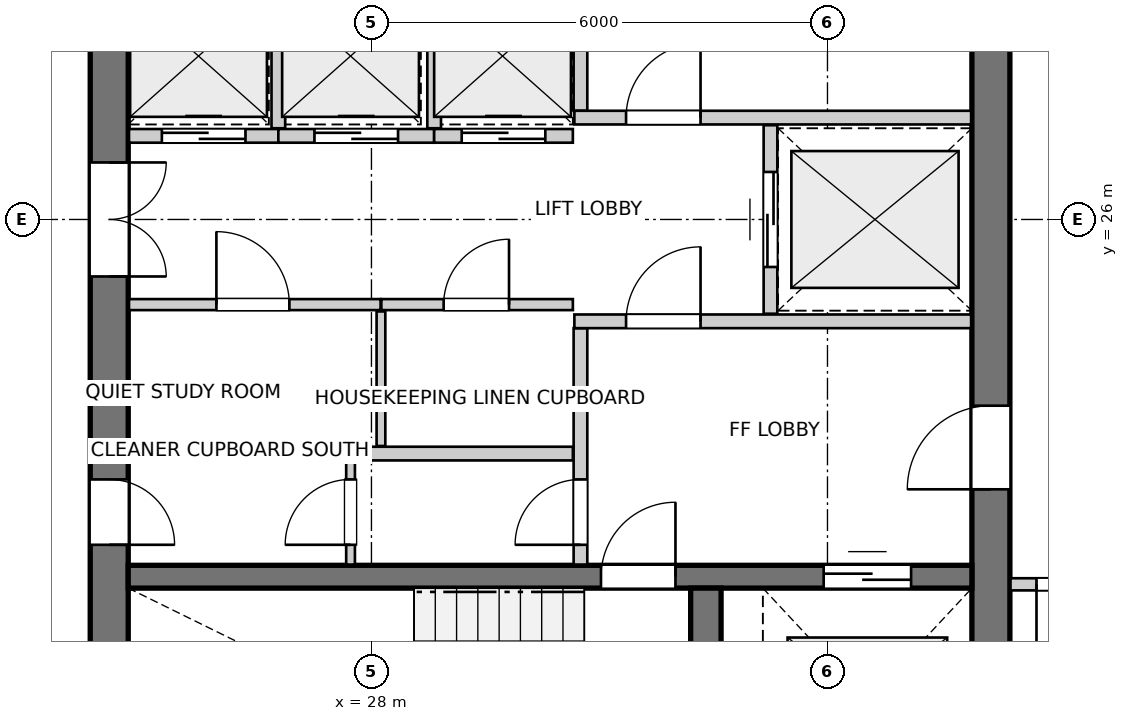
"""IFC4 building model, lengths in metres.
Left out: names, types, materials, properties, quantities, classifications, styles, units other than length and angle.
Written with IfcOpenShell. Run it as: python <this file> out.ifc"""

import sys

from ifc_helpers import new_model, si_unit, direction, frame, frame_2d, origin, place, context, subcontext, project, spatial, rectangle, extrude, source, transform, mapped, element, fill, save


model = new_model("IFC4")
c1 = context("Model", 3, precision=1e-05, world=origin(), true_north=direction((0.0, 1.0)))
c2 = subcontext(c1, "Body", "Model", "MODEL_VIEW")
j1 = project(units=[si_unit("LENGTHUNIT", "METRE"), si_unit("PLANEANGLEUNIT", "RADIAN")], contexts=[c1])
p1 = place(None, origin())
s1 = spatial("IfcSite", under=j1, at=p1, CompositionType="ELEMENT")
p2 = place(p1, origin())
s2 = spatial("IfcBuilding", under=s1, at=p2, CompositionType="ELEMENT")
p3 = place(p2, frame((0.0, 0.0, 208.4)))
s3 = spatial("IfcBuildingStorey", under=s2, at=p3, CompositionType="ELEMENT", Elevation=208.4)
p4 = place(p3, frame((24.55, 33.8, 0.0), z_axis=(0.0, 0.0, 1.0), x_axis=(0.0, -1.0, 0.0)))
e1 = element("IfcWall", 1, at=p4, inside=s3, PredefinedType="SHEAR", context=c2, shape_type="SweptSolid", body=[
    extrude(rectangle(XDim=15.6, YDim=0.5, at=frame_2d((7.8, 0.0))), origin(), (0.0, 0.0, 1.0), 2.935),
])
p5 = place(p4, frame((7.05, 0.0, 0.0)))
e2 = element("IfcOpeningElement", 2, at=p5, cuts=e1, PredefinedType="OPENING", context=c2, shape_type="SweptSolid", body=[
    extrude(rectangle(XDim=1.5, YDim=2.15, at=frame_2d((0.75, 1.075))), frame((0.0, 0.26, 0.0), z_axis=(0.0, -1.0, 0.0), x_axis=(1.0, 0.0, 0.0)), (0.0, 0.0, 1.0), 0.52),
])
p6 = place(p4, frame((3.52, 0.0, 0.0)))
e3 = element("IfcOpeningElement", 3, at=p6, cuts=e1, PredefinedType="OPENING", context=c2, shape_type="SweptSolid", body=[
    extrude(rectangle(XDim=0.86, YDim=2.05, at=frame_2d((0.43, 1.025))), frame((0.0, 0.26, 0.0), z_axis=(0.0, -1.0, 0.0), x_axis=(1.0, 0.0, 0.0)), (0.0, 0.0, 1.0), 0.52),
])
p7 = place(p4, frame((11.22, 0.0, 0.0)))
e4 = element("IfcOpeningElement", 4, at=p7, cuts=e1, PredefinedType="OPENING", context=c2, shape_type="SweptSolid", body=[
    extrude(rectangle(XDim=0.86, YDim=2.05, at=frame_2d((0.43, 1.025))), frame((0.0, 0.26, 0.0), z_axis=(0.0, -1.0, 0.0), x_axis=(1.0, 0.0, 0.0)), (0.0, 0.0, 1.0), 0.52),
])
p8 = place(p3, frame((36.15, 18.2, 0.0), z_axis=(0.0, 0.0, 1.0), x_axis=(0.0, 1.0, 0.0)))
e5 = element("IfcWall", 5, at=p8, inside=s3, PredefinedType="SHEAR", context=c2, shape_type="SweptSolid", body=[
    extrude(rectangle(XDim=15.6, YDim=0.5, at=frame_2d((7.8, 0.0))), origin(), (0.0, 0.0, 1.0), 2.935),
])
p9 = place(p8, frame((4.25, 0.0, 0.0)))
e6 = element("IfcOpeningElement", 6, at=p9, cuts=e5, PredefinedType="OPENING", context=c2, shape_type="SweptSolid", body=[
    extrude(rectangle(XDim=1.1, YDim=2.15, at=frame_2d((0.55, 1.075))), frame((0.0, 0.26, 0.0), z_axis=(0.0, -1.0, 0.0), x_axis=(1.0, 0.0, 0.0)), (0.0, 0.0, 1.0), 0.52),
])
p10 = place(p8, frame((10.25, 0.0, 0.0)))
e7 = element("IfcOpeningElement", 7, at=p10, cuts=e5, PredefinedType="OPENING", context=c2, shape_type="SweptSolid", body=[
    extrude(rectangle(XDim=1.1, YDim=2.15, at=frame_2d((0.55, 1.075))), frame((0.0, 0.26, 0.0), z_axis=(0.0, -1.0, 0.0), x_axis=(1.0, 0.0, 0.0)), (0.0, 0.0, 1.0), 0.52),
])
p11 = place(p3, frame((24.8, 21.3, 0.0), z_axis=(0.0, 0.0, 1.0), x_axis=(1.0, 0.0, 0.0)))
e8 = element("IfcWall", 8, at=p11, inside=s3, PredefinedType="SHEAR", context=c2, shape_type="SweptSolid", body=[
    extrude(rectangle(XDim=11.1, YDim=0.3, at=frame_2d((5.55, 0.0))), origin(), (0.0, 0.0, 1.0), 2.935),
])
p12 = place(p11, frame((6.22, 0.0, 0.0)))
e9 = element("IfcOpeningElement", 9, at=p12, cuts=e8, PredefinedType="OPENING", context=c2, shape_type="SweptSolid", body=[
    extrude(rectangle(XDim=0.98, YDim=2.15, at=frame_2d((0.49, 1.075))), frame((0.0, 0.16, 0.0), z_axis=(0.0, -1.0, 0.0), x_axis=(1.0, 0.0, 0.0)), (0.0, 0.0, 1.0), 0.32),
])
p13 = place(p11, frame((9.15, 0.0, 0.0)))
e10 = element("IfcOpeningElement", 10, at=p13, cuts=e8, PredefinedType="OPENING", context=c2, shape_type="SweptSolid", body=[
    extrude(rectangle(XDim=1.15, YDim=2.15, at=frame_2d((0.575, 1.075))), frame((0.0, 0.16, 0.0), z_axis=(0.0, -1.0, 0.0), x_axis=(1.0, 0.0, 0.0)), (0.0, 0.0, 1.0), 0.32),
])
p14 = place(p3, frame((32.4, 18.2, 0.0), z_axis=(0.0, 0.0, 1.0), x_axis=(0.0, 1.0, 0.0)))
e11 = element("IfcWall", 11, at=p14, inside=s3, PredefinedType="SHEAR", context=c2, shape_type="SweptSolid", body=[
    extrude(rectangle(XDim=2.95, YDim=0.4, at=frame_2d((1.475, 0.0))), origin(), (0.0, 0.0, 1.0), 2.935),
])
p15 = place(p3, frame((30.75, 21.46, 0.0), z_axis=(0.0, 0.0, 1.0), x_axis=(0.0, 1.0, 0.0)))
e12 = element("IfcWall", 12, at=p15, inside=s3, PredefinedType="PARTITIONING", context=c2, shape_type="SweptSolid", body=[
    extrude(rectangle(XDim=3.11, YDim=0.18, at=frame_2d((1.555, 0.0))), origin(), (0.0, 0.0, 1.0), 2.935),
])
p16 = place(p15, frame((0.26, 0.0, 0.0)))
e13 = element("IfcOpeningElement", 13, at=p16, cuts=e12, PredefinedType="OPENING", context=c2, shape_type="SweptSolid", body=[
    extrude(rectangle(XDim=0.86, YDim=2.05, at=frame_2d((0.43, 1.025))), frame((0.0, 0.1, 0.0), z_axis=(0.0, -1.0, 0.0), x_axis=(1.0, 0.0, 0.0)), (0.0, 0.0, 1.0), 0.2),
])
p17 = place(p3, frame((30.67, 24.66, 0.0), z_axis=(0.0, 0.0, 1.0), x_axis=(1.0, 0.0, 0.0)))
e14 = element("IfcWall", 14, at=p17, inside=s3, PredefinedType="PARTITIONING", context=c2, shape_type="SweptSolid", body=[
    extrude(rectangle(XDim=5.22, YDim=0.18, at=frame_2d((2.61, 0.0))), origin(), (0.0, 0.0, 1.0), 2.935),
])
p18 = place(p17, frame((0.68, 0.0, 0.0)))
e15 = element("IfcOpeningElement", 15, at=p18, cuts=e14, PredefinedType="OPENING", context=c2, shape_type="SweptSolid", body=[
    extrude(rectangle(XDim=0.98, YDim=2.15, at=frame_2d((0.49, 1.075))), frame((0.0, 0.1, 0.0), z_axis=(0.0, -1.0, 0.0), x_axis=(1.0, 0.0, 0.0)), (0.0, 0.0, 1.0), 0.2),
])
p19 = place(p3, frame((30.75, 27.43, 0.0), z_axis=(0.0, 0.0, 1.0), x_axis=(0.0, 1.0, 0.0)))
e16 = element("IfcWall", 16, at=p19, inside=s3, PredefinedType="PARTITIONING", context=c2, shape_type="SweptSolid", body=[
    extrude(rectangle(XDim=3.11, YDim=0.18, at=frame_2d((1.555, 0.0))), origin(), (0.0, 0.0, 1.0), 2.935),
])
p20 = place(p19, frame((1.98, 0.0, 0.0)))
e17 = element("IfcOpeningElement", 17, at=p20, cuts=e16, PredefinedType="OPENING", context=c2, shape_type="SweptSolid", body=[
    extrude(rectangle(XDim=0.86, YDim=2.05, at=frame_2d((0.43, 1.025))), frame((0.0, 0.1, 0.0), z_axis=(0.0, -1.0, 0.0), x_axis=(1.0, 0.0, 0.0)), (0.0, 0.0, 1.0), 0.2),
])
p21 = place(p3, frame((30.67, 27.34, 0.0), z_axis=(0.0, 0.0, 1.0), x_axis=(1.0, 0.0, 0.0)))
e18 = element("IfcWall", 18, at=p21, inside=s3, PredefinedType="PARTITIONING", context=c2, shape_type="SweptSolid", body=[
    extrude(rectangle(XDim=5.22, YDim=0.18, at=frame_2d((2.61, 0.0))), origin(), (0.0, 0.0, 1.0), 2.935),
])
p22 = place(p21, frame((0.68, 0.0, 0.0)))
e19 = element("IfcOpeningElement", 19, at=p22, cuts=e18, PredefinedType="OPENING", context=c2, shape_type="SweptSolid", body=[
    extrude(rectangle(XDim=0.98, YDim=2.15, at=frame_2d((0.49, 1.075))), frame((0.0, 0.1, 0.0), z_axis=(0.0, -1.0, 0.0), x_axis=(1.0, 0.0, 0.0)), (0.0, 0.0, 1.0), 0.2),
])
p23 = place(p3, frame((33.25, 24.76, 0.0), z_axis=(0.0, 0.0, 1.0), x_axis=(0.0, 1.0, 0.0)))
e20 = element("IfcWall", 20, at=p23, inside=s3, PredefinedType="PARTITIONING", context=c2, shape_type="SweptSolid", body=[
    extrude(rectangle(XDim=2.48, YDim=0.18, at=frame_2d((1.24, 0.0))), origin(), (0.0, 0.0, 1.0), 2.935),
])
p24 = place(p23, frame((0.615, 0.0, 0.0)))
e21 = element("IfcOpeningElement", 21, at=p24, cuts=e20, PredefinedType="OPENING", context=c2, shape_type="SweptSolid", body=[
    extrude(rectangle(XDim=1.25, YDim=2.15, at=frame_2d((0.625, 1.075))), frame((0.0, 0.1, 0.0), z_axis=(0.0, -1.0, 0.0), x_axis=(1.0, 0.0, 0.0)), (0.0, 0.0, 1.0), 0.2),
])
p25 = place(p3, frame((24.81, 22.92, 0.0), z_axis=(0.0, 0.0, 1.0), x_axis=(1.0, 0.0, 0.0)))
e22 = element("IfcWall", 22, at=p25, inside=s3, PredefinedType="PARTITIONING", context=c2, shape_type="SweptSolid", body=[
    extrude(rectangle(XDim=5.84, YDim=0.18, at=frame_2d((2.92, 0.0))), origin(), (0.0, 0.0, 1.0), 2.935),
])
p26 = place(p3, frame((24.81, 24.88, 0.0), z_axis=(0.0, 0.0, 1.0), x_axis=(1.0, 0.0, 0.0)))
e23 = element("IfcWall", 23, at=p26, inside=s3, PredefinedType="PARTITIONING", context=c2, shape_type="SweptSolid", body=[
    extrude(rectangle(XDim=3.31, YDim=0.145, at=frame_2d((1.655, 0.0))), origin(), (0.0, 0.0, 1.0), 2.935),
])
p27 = place(p26, frame((1.15, 0.0, 0.0)))
e24 = element("IfcOpeningElement", 24, at=p27, cuts=e23, PredefinedType="OPENING", context=c2, shape_type="SweptSolid", body=[
    extrude(rectangle(XDim=0.96, YDim=2.1, at=frame_2d((0.48, 1.05))), frame((0.0, 0.083, 0.0), z_axis=(0.0, -1.0, 0.0), x_axis=(1.0, 0.0, 0.0)), (0.0, 0.0, 1.0), 0.165),
])
p28 = place(p3, frame((28.13, 24.88, 0.0), z_axis=(0.0, 0.0, 1.0), x_axis=(1.0, 0.0, 0.0)))
e25 = element("IfcWall", 25, at=p28, inside=s3, PredefinedType="PARTITIONING", context=c2, shape_type="SweptSolid", body=[
    extrude(rectangle(XDim=2.52, YDim=0.145, at=frame_2d((1.26, 0.0))), origin(), (0.0, 0.0, 1.0), 2.935),
])
p29 = place(p28, frame((0.82, 0.0, 0.0)))
e26 = element("IfcOpeningElement", 26, at=p29, cuts=e25, PredefinedType="OPENING", context=c2, shape_type="SweptSolid", body=[
    extrude(rectangle(XDim=0.86, YDim=2.05, at=frame_2d((0.43, 1.025))), frame((0.0, 0.083, 0.0), z_axis=(0.0, -1.0, 0.0), x_axis=(1.0, 0.0, 0.0)), (0.0, 0.0, 1.0), 0.165),
])
p30 = place(p3, frame((28.125, 23.02, 0.0), z_axis=(0.0, 0.0, 1.0), x_axis=(0.0, 1.0, 0.0)))
e27 = element("IfcWall", 27, at=p30, inside=s3, PredefinedType="PARTITIONING", context=c2, shape_type="SweptSolid", body=[
    extrude(rectangle(XDim=1.77, YDim=0.115, at=frame_2d((0.885, 0.0))), origin(), (0.0, 0.0, 1.0), 2.935),
])
p31 = place(p3, frame((24.81, 27.1, 0.0), z_axis=(0.0, 0.0, 1.0), x_axis=(1.0, 0.0, 0.0)))
e28 = element("IfcWall", 28, at=p31, inside=s3, PredefinedType="PARTITIONING", context=c2, shape_type="SweptSolid", body=[
    extrude(rectangle(XDim=1.965, YDim=0.18, at=frame_2d((0.982, 0.0))), origin(), (0.0, 0.0, 1.0), 2.935),
])
p32 = place(p31, frame((0.433, 0.0, 0.0)))
e29 = element("IfcOpeningElement", 29, at=p32, cuts=e28, PredefinedType="OPENING", context=c2, shape_type="SweptSolid", body=[
    extrude(rectangle(XDim=1.1, YDim=2.15, at=frame_2d((0.55, 1.075))), frame((0.0, 0.1, 0.0), z_axis=(0.0, -1.0, 0.0), x_axis=(1.0, 0.0, 0.0)), (0.0, 0.0, 1.0), 0.2),
])
p33 = place(p3, frame((26.775, 27.1, 0.0), z_axis=(0.0, 0.0, 1.0), x_axis=(1.0, 0.0, 0.0)))
e30 = element("IfcWall", 30, at=p33, inside=s3, PredefinedType="PARTITIONING", context=c2, shape_type="SweptSolid", body=[
    extrude(rectangle(XDim=2.05, YDim=0.18, at=frame_2d((1.025, 0.0))), origin(), (0.0, 0.0, 1.0), 2.935),
])
p34 = place(p33, frame((0.475, 0.0, 0.0)))
e31 = element("IfcOpeningElement", 31, at=p34, cuts=e30, PredefinedType="OPENING", context=c2, shape_type="SweptSolid", body=[
    extrude(rectangle(XDim=1.1, YDim=2.15, at=frame_2d((0.55, 1.075))), frame((0.0, 0.1, 0.0), z_axis=(0.0, -1.0, 0.0), x_axis=(1.0, 0.0, 0.0)), (0.0, 0.0, 1.0), 0.2),
])
p35 = place(p3, frame((26.775, 27.2, 0.0), z_axis=(0.0, 0.0, 1.0), x_axis=(0.0, 1.0, 0.0)))
e32 = element("IfcWall", 32, at=p35, inside=s3, PredefinedType="PARTITIONING", context=c2, shape_type="SweptSolid", body=[
    extrude(rectangle(XDim=1.78, YDim=0.18, at=frame_2d((0.89, 0.0))), origin(), (0.0, 0.0, 1.0), 2.935),
])
p36 = place(p3, frame((28.825, 27.1, 0.0), z_axis=(0.0, 0.0, 1.0), x_axis=(1.0, 0.0, 0.0)))
e33 = element("IfcWall", 33, at=p36, inside=s3, PredefinedType="PARTITIONING", context=c2, shape_type="SweptSolid", body=[
    extrude(rectangle(XDim=1.825, YDim=0.18, at=frame_2d((0.913, 0.0))), origin(), (0.0, 0.0, 1.0), 2.935),
])
p37 = place(p36, frame((0.363, 0.0, 0.0)))
e34 = element("IfcOpeningElement", 34, at=p37, cuts=e33, PredefinedType="OPENING", context=c2, shape_type="SweptSolid", body=[
    extrude(rectangle(XDim=1.1, YDim=2.15, at=frame_2d((0.55, 1.075))), frame((0.0, 0.1, 0.0), z_axis=(0.0, -1.0, 0.0), x_axis=(1.0, 0.0, 0.0)), (0.0, 0.0, 1.0), 0.2),
])
p38 = place(p3, frame((28.825, 27.2, 0.0), z_axis=(0.0, 0.0, 1.0), x_axis=(0.0, 1.0, 0.0)))
e35 = element("IfcWall", 35, at=p38, inside=s3, PredefinedType="PARTITIONING", context=c2, shape_type="SweptSolid", body=[
    extrude(rectangle(XDim=1.78, YDim=0.18, at=frame_2d((0.89, 0.0))), origin(), (0.0, 0.0, 1.0), 2.935),
])
p39 = place(p3, frame((27.725, 21.46, 0.0), z_axis=(0.0, 0.0, 1.0), x_axis=(0.0, 1.0, 0.0)))
e36 = element("IfcWall", 36, at=p39, inside=s3, PredefinedType="PARTITIONING", context=c2, shape_type="SweptSolid", body=[
    extrude(rectangle(XDim=1.38, YDim=0.115, at=frame_2d((0.69, 0.0))), origin(), (0.0, 0.0, 1.0), 2.935),
])
p40 = place(p39, frame((0.26, 0.0, 0.0)))
e37 = element("IfcOpeningElement", 37, at=p40, cuts=e36, PredefinedType="OPENING", context=c2, shape_type="SweptSolid", body=[
    extrude(rectangle(XDim=0.86, YDim=2.05, at=frame_2d((0.43, 1.025))), frame((0.0, 0.067, 0.0), z_axis=(0.0, -1.0, 0.0), x_axis=(1.0, 0.0, 0.0)), (0.0, 0.0, 1.0), 0.135),
])
p41 = place(p3, frame((38.02, 21.2, 0.0), z_axis=(0.0, 0.0, 1.0), x_axis=(-1.0, 0.0, 0.0)))
e38 = element("IfcWall", 38, at=p41, inside=s3, PredefinedType="PARTITIONING", context=c2, shape_type="SweptSolid", body=[
    extrude(rectangle(XDim=1.612, YDim=0.16, at=frame_2d((0.806, 0.0))), origin(), (0.0, 0.0, 1.0), 2.935),
])
p42 = place(p41, frame((0.35, 0.0, 0.0)))
e39 = element("IfcOpeningElement", 39, at=p42, cuts=e38, PredefinedType="OPENING", context=c2, shape_type="SweptSolid", body=[
    extrude(rectangle(XDim=0.92, YDim=2.1, at=frame_2d((0.46, 1.05))), frame((0.0, 0.09, 0.0), z_axis=(0.0, -1.0, 0.0), x_axis=(1.0, 0.0, 0.0)), (0.0, 0.0, 1.0), 0.18),
])
m1 = source(origin(), c2, "Body", "SweptSolid", [
    extrude(rectangle(XDim=0.98, YDim=2.15, at=frame_2d((0.49, 1.075))), frame((0.0, 0.025, 0.0), z_axis=(0.0, -1.0, 0.0), x_axis=(1.0, 0.0, 0.0)), (0.0, 0.0, 1.0), 0.05),
])
p43 = place(p12, origin())
e40 = element("IfcDoor", 40, at=p43, inside=s3, OperationType="SINGLE_SWING_RIGHT", PredefinedType="DOOR", context=c2, shape_type="MappedRepresentation", body=[
    mapped(m1, transform((0.0, 0.0, 0.0), x_axis=(1.0, 0.0, 0.0), y_axis=(0.0, 1.0, 0.0), z_axis=(0.0, 0.0, 1.0), scale=1.0)),
])
fill(e9, e40)
m2 = source(origin(), c2, "Body", "SweptSolid", [
    extrude(rectangle(XDim=1.15, YDim=2.15, at=frame_2d((0.575, 1.075))), frame((0.0, 0.025, 0.0), z_axis=(0.0, -1.0, 0.0), x_axis=(1.0, 0.0, 0.0)), (0.0, 0.0, 1.0), 0.05),
])
p44 = place(p13, origin())
e41 = element("IfcDoor", 41, at=p44, inside=s3, OperationType="DOUBLE_DOOR_SLIDING", PredefinedType="DOOR", context=c2, shape_type="MappedRepresentation", body=[
    mapped(m2, transform((0.0, 0.0, 0.0), x_axis=(1.0, 0.0, 0.0), y_axis=(0.0, 1.0, 0.0), z_axis=(0.0, 0.0, 1.0), scale=1.0)),
])
fill(e10, e41)
m3 = source(origin(), c2, "Body", "SweptSolid", [
    extrude(rectangle(XDim=1.1, YDim=2.15, at=frame_2d((0.55, 1.075))), frame((0.0, 0.025, 0.0), z_axis=(0.0, -1.0, 0.0), x_axis=(1.0, 0.0, 0.0)), (0.0, 0.0, 1.0), 0.05),
])
p45 = place(p9, origin())
e42 = element("IfcDoor", 42, at=p45, inside=s3, OperationType="SINGLE_SWING_LEFT", PredefinedType="DOOR", context=c2, shape_type="MappedRepresentation", body=[
    mapped(m3, transform((0.0, 0.0, 0.0), x_axis=(1.0, 0.0, 0.0), y_axis=(0.0, 1.0, 0.0), z_axis=(0.0, 0.0, 1.0), scale=1.0)),
])
fill(e6, e42)
m4 = source(origin(), c2, "Body", "SweptSolid", [
    extrude(rectangle(XDim=1.5, YDim=2.15, at=frame_2d((0.75, 1.075))), frame((0.0, 0.025, 0.0), z_axis=(0.0, -1.0, 0.0), x_axis=(1.0, 0.0, 0.0)), (0.0, 0.0, 1.0), 0.05),
])
p46 = place(p5, origin())
e43 = element("IfcDoor", 43, at=p46, inside=s3, OperationType="DOUBLE_DOOR_SINGLE_SWING", PredefinedType="DOOR", context=c2, shape_type="MappedRepresentation", body=[
    mapped(m4, transform((0.0, 0.0, 0.0), x_axis=(1.0, 0.0, 0.0), y_axis=(0.0, 1.0, 0.0), z_axis=(0.0, 0.0, 1.0), scale=1.0)),
])
fill(e2, e43)
m5 = source(origin(), c2, "Body", "SweptSolid", [
    extrude(rectangle(XDim=0.86, YDim=2.05, at=frame_2d((0.43, 1.025))), frame((0.0, 0.025, 0.0), z_axis=(0.0, -1.0, 0.0), x_axis=(1.0, 0.0, 0.0)), (0.0, 0.0, 1.0), 0.05),
])
p47 = place(p7, origin())
e44 = element("IfcDoor", 44, at=p47, inside=s3, OperationType="SINGLE_SWING_RIGHT", PredefinedType="DOOR", context=c2, shape_type="MappedRepresentation", body=[
    mapped(m5, transform((0.0, 0.0, 0.0), x_axis=(1.0, 0.0, 0.0), y_axis=(0.0, 1.0, 0.0), z_axis=(0.0, 0.0, 1.0), scale=1.0)),
])
fill(e4, e44)
p48 = place(p16, origin())
e45 = element("IfcDoor", 45, at=p48, inside=s3, OperationType="SINGLE_SWING_LEFT", PredefinedType="DOOR", context=c2, shape_type="MappedRepresentation", body=[
    mapped(m5, transform((0.0, 0.0, 0.0), x_axis=(1.0, 0.0, 0.0), y_axis=(0.0, 1.0, 0.0), z_axis=(0.0, 0.0, 1.0), scale=1.0)),
])
fill(e13, e45)
p49 = place(p18, origin())
e46 = element("IfcDoor", 46, at=p49, inside=s3, OperationType="SINGLE_SWING_RIGHT", PredefinedType="DOOR", context=c2, shape_type="MappedRepresentation", body=[
    mapped(m1, transform((0.0, 0.0, 0.0), x_axis=(1.0, 0.0, 0.0), y_axis=(0.0, 1.0, 0.0), z_axis=(0.0, 0.0, 1.0), scale=1.0)),
])
fill(e15, e46)
p50 = place(p22, origin())
e47 = element("IfcDoor", 47, at=p50, inside=s3, OperationType="SINGLE_SWING_RIGHT", PredefinedType="DOOR", context=c2, shape_type="MappedRepresentation", body=[
    mapped(m1, transform((0.0, 0.0, 0.0), x_axis=(1.0, 0.0, 0.0), y_axis=(0.0, 1.0, 0.0), z_axis=(0.0, 0.0, 1.0), scale=1.0)),
])
fill(e19, e47)
m6 = source(origin(), c2, "Body", "SweptSolid", [
    extrude(rectangle(XDim=1.25, YDim=2.15, at=frame_2d((0.625, 1.075))), frame((0.0, 0.025, 0.0), z_axis=(0.0, -1.0, 0.0), x_axis=(1.0, 0.0, 0.0)), (0.0, 0.0, 1.0), 0.05),
])
p51 = place(p24, origin())
e48 = element("IfcDoor", 48, at=p51, inside=s3, OperationType="DOUBLE_DOOR_SLIDING", PredefinedType="DOOR", context=c2, shape_type="MappedRepresentation", body=[
    mapped(m6, transform((0.0, 0.0, 0.0), x_axis=(1.0, 0.0, 0.0), y_axis=(0.0, 1.0, 0.0), z_axis=(0.0, 0.0, 1.0), scale=1.0)),
])
fill(e21, e48)
m7 = source(origin(), c2, "Body", "SweptSolid", [
    extrude(rectangle(XDim=0.96, YDim=2.1, at=frame_2d((0.48, 1.05))), frame((0.0, 0.025, 0.0), z_axis=(0.0, -1.0, 0.0), x_axis=(1.0, 0.0, 0.0)), (0.0, 0.0, 1.0), 0.05),
])
p52 = place(p27, origin())
e49 = element("IfcDoor", 49, at=p52, inside=s3, OperationType="SINGLE_SWING_LEFT", PredefinedType="DOOR", context=c2, shape_type="MappedRepresentation", body=[
    mapped(m7, transform((0.0, 0.0, 0.0), x_axis=(1.0, 0.0, 0.0), y_axis=(0.0, 1.0, 0.0), z_axis=(0.0, 0.0, 1.0), scale=1.0)),
])
fill(e24, e49)
p53 = place(p29, origin())
e50 = element("IfcDoor", 50, at=p53, inside=s3, OperationType="SINGLE_SWING_RIGHT", PredefinedType="DOOR", context=c2, shape_type="MappedRepresentation", body=[
    mapped(m5, transform((0.0, 0.0, 0.0), x_axis=(1.0, 0.0, 0.0), y_axis=(0.0, 1.0, 0.0), z_axis=(0.0, 0.0, 1.0), scale=1.0)),
])
fill(e26, e50)
p54 = place(p32, origin())
e51 = element("IfcDoor", 51, at=p54, inside=s3, OperationType="DOUBLE_DOOR_SLIDING", PredefinedType="DOOR", context=c2, shape_type="MappedRepresentation", body=[
    mapped(m3, transform((0.0, 0.0, 0.0), x_axis=(1.0, 0.0, 0.0), y_axis=(0.0, 1.0, 0.0), z_axis=(0.0, 0.0, 1.0), scale=1.0)),
])
fill(e29, e51)
p55 = place(p34, origin())
e52 = element("IfcDoor", 52, at=p55, inside=s3, OperationType="DOUBLE_DOOR_SLIDING", PredefinedType="DOOR", context=c2, shape_type="MappedRepresentation", body=[
    mapped(m3, transform((0.0, 0.0, 0.0), x_axis=(1.0, 0.0, 0.0), y_axis=(0.0, 1.0, 0.0), z_axis=(0.0, 0.0, 1.0), scale=1.0)),
])
fill(e31, e52)
p56 = place(p37, origin())
e53 = element("IfcDoor", 53, at=p56, inside=s3, OperationType="DOUBLE_DOOR_SLIDING", PredefinedType="DOOR", context=c2, shape_type="MappedRepresentation", body=[
    mapped(m3, transform((0.0, 0.0, 0.0), x_axis=(1.0, 0.0, 0.0), y_axis=(0.0, 1.0, 0.0), z_axis=(0.0, 0.0, 1.0), scale=1.0)),
])
fill(e34, e53)
p57 = place(p40, origin())
e54 = element("IfcDoor", 54, at=p57, inside=s3, OperationType="SINGLE_SWING_LEFT", PredefinedType="DOOR", context=c2, shape_type="MappedRepresentation", body=[
    mapped(m5, transform((0.0, 0.0, 0.0), x_axis=(1.0, 0.0, 0.0), y_axis=(0.0, 1.0, 0.0), z_axis=(0.0, 0.0, 1.0), scale=1.0)),
])
fill(e37, e54)
m8 = source(origin(), c2, "Body", "SweptSolid", [
    extrude(rectangle(XDim=0.92, YDim=2.1, at=frame_2d((0.46, 1.05))), frame((0.0, 0.025, 0.0), z_axis=(0.0, -1.0, 0.0), x_axis=(1.0, 0.0, 0.0)), (0.0, 0.0, 1.0), 0.05),
])
p58 = place(p42, origin())
e55 = element("IfcDoor", 55, at=p58, inside=s3, OperationType="SINGLE_SWING_RIGHT", PredefinedType="DOOR", context=c2, shape_type="MappedRepresentation", body=[
    mapped(m8, transform((0.0, 0.0, 0.0), x_axis=(1.0, 0.0, 0.0), y_axis=(0.0, 1.0, 0.0), z_axis=(0.0, 0.0, 1.0), scale=1.0)),
])
fill(e39, e55)
save(model, sys.argv[1])
